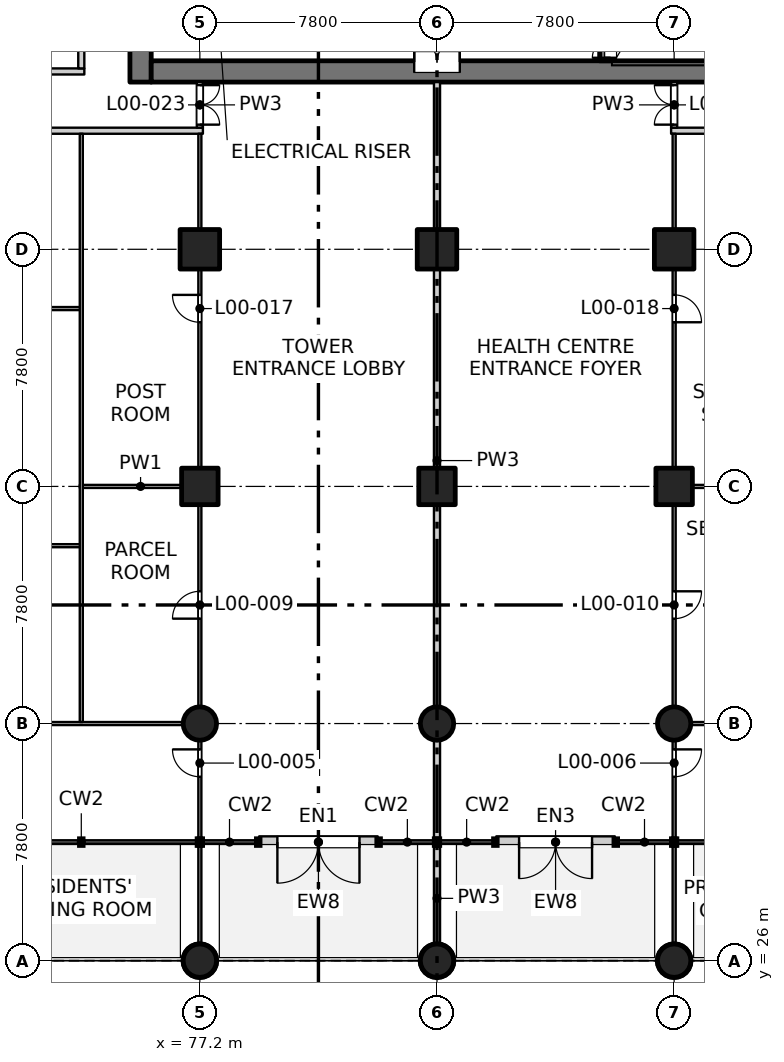
"""IFC4 building model, lengths in metres.
Left out: names, types, materials, properties, quantities, classifications, styles, units other than length and angle.
Written with IfcOpenShell. Run it as: python <this file> out.ifc"""

import sys

from ifc_helpers import new_model, si_unit, direction, frame, frame_2d, origin, origin_2d, place, context, subcontext, project, spatial, rectangle, circle, extrude, element, fill, save


model = new_model("IFC4")
c1 = context("Model", 3, precision=1e-05, world=origin(), true_north=direction((0.0, 1.0)))
c2 = subcontext(c1, "Body", "Model", "MODEL_VIEW")
j1 = project(units=[si_unit("LENGTHUNIT", "METRE"), si_unit("PLANEANGLEUNIT", "RADIAN")], contexts=[c1])
p1 = place(None, origin())
s1 = spatial("IfcSite", under=j1, at=p1, CompositionType="ELEMENT")
p2 = place(p1, origin())
s2 = spatial("IfcBuilding", under=s1, at=p2, CompositionType="ELEMENT")
p3 = place(p2, origin())
s3 = spatial("IfcBuildingStorey", under=s2, at=p3, CompositionType="ELEMENT", Elevation=0.0)
for number, where, z_axis, x_axis in (
    (1, (77.2, 41.6, -0.4), (0.0, 0.0, 1.0), (1.0, 0.0, 0.0)),
    (2, (85.0, 41.6, -0.4), (0.0, 0.0, 1.0), (1.0, 0.0, 0.0)),
    (3, (92.8, 41.6, -0.4), (0.0, 0.0, 1.0), (1.0, 0.0, 0.0)),
):
    element("IfcColumn", number, at=place(p3, frame(where, z_axis=z_axis, x_axis=x_axis)), inside=s3, PredefinedType="COLUMN", context=c2, shape_type="SweptSolid", body=[
        extrude(rectangle(XDim=1.2, YDim=1.2, at=origin_2d()), origin(), (0.0, 0.0, 1.0), 6.1),
    ])
for number, where, z_axis, x_axis in (
    (4, (77.2, 49.4, -0.4), (0.0, 0.0, 1.0), (1.0, 0.0, 0.0)),
    (5, (85.0, 49.4, -0.4), (0.0, 0.0, 1.0), (1.0, 0.0, 0.0)),
    (6, (92.8, 49.4, -0.4), (0.0, 0.0, 1.0), (1.0, 0.0, 0.0)),
):
    element("IfcColumn", number, at=place(p3, frame(where, z_axis=z_axis, x_axis=x_axis)), inside=s3, PredefinedType="COLUMN", context=c2, shape_type="SweptSolid", body=[
        extrude(rectangle(XDim=1.3, YDim=1.3, at=origin_2d()), origin(), (0.0, 0.0, 1.0), 6.1),
    ])
for number, where, z_axis, x_axis in (
    (7, (77.2, 26.0, -0.4), (0.0, 0.0, 1.0), (1.0, 0.0, 0.0)),
    (8, (77.2, 33.8, -0.4), (0.0, 0.0, 1.0), (1.0, 0.0, 0.0)),
    (9, (85.0, 26.0, -0.4), (0.0, 0.0, 1.0), (1.0, 0.0, 0.0)),
    (10, (85.0, 33.8, -0.4), (0.0, 0.0, 1.0), (1.0, 0.0, 0.0)),
    (11, (92.8, 26.0, -0.4), (0.0, 0.0, 1.0), (1.0, 0.0, 0.0)),
    (12, (92.8, 33.8, -0.4), (0.0, 0.0, 1.0), (1.0, 0.0, 0.0)),
):
    element("IfcColumn", number, at=place(p3, frame(where, z_axis=z_axis, x_axis=x_axis)), inside=s3, PredefinedType="COLUMN", context=c2, shape_type="SweptSolid", body=[
        extrude(circle(Radius=0.55, at=origin_2d()), origin(), (0.0, 0.0, 1.0), 6.1),
    ])
p4 = place(p3, frame((75.25, 54.9, -0.4), z_axis=(0.0, 0.0, 1.0), x_axis=(0.0, 1.0, 0.0)))
e13 = element("IfcWall", 13, at=p4, inside=s3, PredefinedType="SOLIDWALL", context=c2, shape_type="SweptSolid", body=[
    extrude(rectangle(XDim=22.4, YDim=0.7, at=frame_2d((11.2, 0.0))), origin(), (0.0, 0.0, 1.0), 6.1),
])
p5 = place(p4, frame((7.55, 0.0, 0.4)))
e14 = element("IfcOpeningElement", 14, at=p5, cuts=e13, PredefinedType="OPENING", context=c2, shape_type="SweptSolid", body=[
    extrude(rectangle(XDim=0.9, YDim=2.1, at=frame_2d((0.45, 1.05))), frame((0.0, 0.36, 0.0), z_axis=(0.0, -1.0, 0.0), x_axis=(1.0, 0.0, 0.0)), (0.0, 0.0, 1.0), 0.72),
])
p6 = place(p4, frame((10.85, 0.0, 0.4)))
e15 = element("IfcOpeningElement", 15, at=p6, cuts=e13, PredefinedType="OPENING", context=c2, shape_type="SweptSolid", body=[
    extrude(rectangle(XDim=0.9, YDim=2.1, at=frame_2d((0.45, 1.05))), frame((0.0, 0.36, 0.0), z_axis=(0.0, -1.0, 0.0), x_axis=(1.0, 0.0, 0.0)), (0.0, 0.0, 1.0), 0.72),
])
p7 = place(p4, frame((13.85, 0.0, 0.4)))
e16 = element("IfcOpeningElement", 16, at=p7, cuts=e13, PredefinedType="OPENING", context=c2, shape_type="SweptSolid", body=[
    extrude(rectangle(XDim=0.9, YDim=2.1, at=frame_2d((0.45, 1.05))), frame((0.0, 0.36, 0.0), z_axis=(0.0, -1.0, 0.0), x_axis=(1.0, 0.0, 0.0)), (0.0, 0.0, 1.0), 0.72),
])
p8 = place(p4, frame((16.85, 0.0, 0.4)))
e17 = element("IfcOpeningElement", 17, at=p8, cuts=e13, PredefinedType="OPENING", context=c2, shape_type="SweptSolid", body=[
    extrude(rectangle(XDim=0.9, YDim=2.1, at=frame_2d((0.45, 1.05))), frame((0.0, 0.36, 0.0), z_axis=(0.0, -1.0, 0.0), x_axis=(1.0, 0.0, 0.0)), (0.0, 0.0, 1.0), 0.72),
])
p9 = place(p4, frame((20.15, 0.0, 0.4)))
e18 = element("IfcOpeningElement", 18, at=p9, cuts=e13, PredefinedType="OPENING", context=c2, shape_type="SweptSolid", body=[
    extrude(rectangle(XDim=0.9, YDim=2.1, at=frame_2d((0.45, 1.05))), frame((0.0, 0.36, 0.0), z_axis=(0.0, -1.0, 0.0), x_axis=(1.0, 0.0, 0.0)), (0.0, 0.0, 1.0), 0.72),
])
p10 = place(p3, frame((75.6, 55.25, -0.4), z_axis=(0.0, 0.0, 1.0), x_axis=(1.0, 0.0, 0.0)))
e19 = element("IfcWall", 19, at=p10, inside=s3, PredefinedType="SOLIDWALL", context=c2, shape_type="SweptSolid", body=[
    extrude(rectangle(XDim=18.8, YDim=0.7, at=frame_2d((9.4, 0.0))), origin(), (0.0, 0.0, 1.0), 6.1),
])
p11 = place(p10, frame((8.65, 0.0, 0.4)))
e20 = element("IfcOpeningElement", 20, at=p11, cuts=e19, PredefinedType="OPENING", context=c2, shape_type="SweptSolid", body=[
    extrude(rectangle(XDim=1.5, YDim=2.1, at=frame_2d((0.75, 1.05))), frame((0.0, 0.36, 0.0), z_axis=(0.0, -1.0, 0.0), x_axis=(1.0, 0.0, 0.0)), (0.0, 0.0, 1.0), 0.72),
])
p12 = place(p3, frame((90.55, 55.6, -0.4), z_axis=(0.0, 0.0, 1.0), x_axis=(0.0, 1.0, 0.0)))
e21 = element("IfcWall", 21, at=p12, inside=s3, PredefinedType="SOLIDWALL", context=c2, shape_type="SweptSolid", body=[
    extrude(rectangle(XDim=6.35, YDim=0.4, at=frame_2d((3.175, 0.0))), origin(), (0.0, 0.0, 1.0), 6.1),
])
p13 = place(p12, frame((0.1, 0.0, 0.4)))
e22 = element("IfcOpeningElement", 22, at=p13, cuts=e21, PredefinedType="OPENING", context=c2, shape_type="SweptSolid", body=[
    extrude(rectangle(XDim=1.2, YDim=2.1, at=frame_2d((0.6, 1.05))), frame((0.0, 0.21, 0.0), z_axis=(0.0, -1.0, 0.0), x_axis=(1.0, 0.0, 0.0)), (0.0, 0.0, 1.0), 0.42),
])
p14 = place(p3, frame((79.15, 29.9, 0.0), z_axis=(0.0, 0.0, 1.0), x_axis=(1.0, 0.0, 0.0)))
e23 = element("IfcWall", 23, at=p14, inside=s3, PredefinedType="SOLIDWALL", context=c2, shape_type="SweptSolid", body=[
    extrude(rectangle(XDim=3.9, YDim=0.38, at=frame_2d((1.95, 0.0))), origin(), (0.0, 0.0, 1.0), 5.7),
])
p15 = place(p14, frame((0.6, 0.0, 0.0)))
e24 = element("IfcOpeningElement", 24, at=p15, cuts=e23, PredefinedType="OPENING", context=c2, shape_type="SweptSolid", body=[
    extrude(rectangle(XDim=2.7, YDim=2.7, at=frame_2d((1.35, 1.35))), frame((0.0, 0.2, 0.0), z_axis=(0.0, -1.0, 0.0), x_axis=(1.0, 0.0, 0.0)), (0.0, 0.0, 1.0), 0.4),
])
p16 = place(p3, frame((86.95, 29.9, 0.0), z_axis=(0.0, 0.0, 1.0), x_axis=(1.0, 0.0, 0.0)))
e25 = element("IfcWall", 25, at=p16, inside=s3, PredefinedType="SOLIDWALL", context=c2, shape_type="SweptSolid", body=[
    extrude(rectangle(XDim=3.9, YDim=0.38, at=frame_2d((1.95, 0.0))), origin(), (0.0, 0.0, 1.0), 5.7),
])
p17 = place(p16, frame((0.75, 0.0, 0.0)))
e26 = element("IfcOpeningElement", 26, at=p17, cuts=e25, PredefinedType="OPENING", context=c2, shape_type="SweptSolid", body=[
    extrude(rectangle(XDim=2.4, YDim=2.4, at=frame_2d((1.2, 1.2))), frame((0.0, 0.2, 0.0), z_axis=(0.0, -1.0, 0.0), x_axis=(1.0, 0.0, 0.0)), (0.0, 0.0, 1.0), 0.4),
])
p18 = place(p3, frame((64.4, 33.8, 0.0), z_axis=(0.0, 0.0, 1.0), x_axis=(1.0, 0.0, 0.0)))
e27 = element("IfcWall", 27, at=p18, inside=s3, PredefinedType="PARTITIONING", context=c2, shape_type="SweptSolid", body=[
    extrude(rectangle(XDim=12.85, YDim=0.1, at=frame_2d((6.425, 0.0))), origin(), (0.0, 0.0, 1.0), 5.7),
])
p19 = place(p3, frame((92.75, 33.8, 0.0), z_axis=(0.0, 0.0, 1.0), x_axis=(1.0, 0.0, 0.0)))
e28 = element("IfcWall", 28, at=p19, inside=s3, PredefinedType="PARTITIONING", context=c2, shape_type="SweptSolid", body=[
    extrude(rectangle(XDim=4.0, YDim=0.1, at=frame_2d((2.0, 0.0))), origin(), (0.0, 0.0, 1.0), 5.7),
])
p20 = place(p3, frame((59.55, 39.65, 0.0), z_axis=(0.0, 0.0, 1.0), x_axis=(1.0, 0.0, 0.0)))
e29 = element("IfcWall", 29, at=p20, inside=s3, PredefinedType="PARTITIONING", context=c2, shape_type="SweptSolid", body=[
    extrude(rectangle(XDim=13.8, YDim=0.1, at=frame_2d((6.9, 0.0))), origin(), (0.0, 0.0, 1.0), 5.7),
])
for number, where, z_axis, x_axis in (
    (30, (73.25, 41.6, 0.0), (0.0, 0.0, 1.0), (1.0, 0.0, 0.0)),
    (31, (92.75, 41.6, 0.0), (0.0, 0.0, 1.0), (1.0, 0.0, 0.0)),
):
    element("IfcWall", number, at=place(p3, frame(where, z_axis=z_axis, x_axis=x_axis)), inside=s3, PredefinedType="PARTITIONING", context=c2, shape_type="SweptSolid", body=[
        extrude(rectangle(XDim=4.0, YDim=0.1, at=frame_2d((2.0, 0.0))), origin(), (0.0, 0.0, 1.0), 5.7),
    ])
p21 = place(p3, frame((59.55, 47.45, 0.0), z_axis=(0.0, 0.0, 1.0), x_axis=(1.0, 0.0, 0.0)))
e32 = element("IfcWall", 32, at=p21, inside=s3, PredefinedType="PARTITIONING", context=c2, shape_type="SweptSolid", body=[
    extrude(rectangle(XDim=13.8, YDim=0.1, at=frame_2d((6.9, 0.0))), origin(), (0.0, 0.0, 1.0), 5.7),
])
for number, where, z_axis, x_axis in (
    (33, (59.55, 53.3, 0.0), (0.0, 0.0, 1.0), (1.0, 0.0, 0.0)),
    (34, (92.7, 53.3, 0.0), (0.0, 0.0, 1.0), (1.0, 0.0, 0.0)),
):
    element("IfcWall", number, at=place(p3, frame(where, z_axis=z_axis, x_axis=x_axis)), inside=s3, PredefinedType="PARTITIONING", context=c2, shape_type="SweptSolid", body=[
        extrude(rectangle(XDim=17.75, YDim=0.2, at=frame_2d((8.875, 0.0))), origin(), (0.0, 0.0, 1.0), 5.7),
    ])
p22 = place(p3, frame((59.55, 55.25, 0.0), z_axis=(0.0, 0.0, 1.0), x_axis=(1.0, 0.0, 0.0)))
e35 = element("IfcWall", 35, at=p22, inside=s3, PredefinedType="PARTITIONING", context=c2, shape_type="SweptSolid", body=[
    extrude(rectangle(XDim=13.85, YDim=0.2, at=frame_2d((6.925, 0.0))), origin(), (0.0, 0.0, 1.0), 5.7),
])
p23 = place(p3, frame((73.3, 33.85, 0.0), z_axis=(0.0, 0.0, 1.0), x_axis=(0.0, 1.0, 0.0)))
e36 = element("IfcWall", 36, at=p23, inside=s3, PredefinedType="PARTITIONING", context=c2, shape_type="SweptSolid", body=[
    extrude(rectangle(XDim=19.35, YDim=0.1, at=frame_2d((9.675, 0.0))), origin(), (0.0, 0.0, 1.0), 5.7),
])
p24 = place(p3, frame((73.3, 55.35, 0.0), z_axis=(0.0, 0.0, 1.0), x_axis=(0.0, 1.0, 0.0)))
e37 = element("IfcWall", 37, at=p24, inside=s3, PredefinedType="PARTITIONING", context=c2, shape_type="SweptSolid", body=[
    extrude(rectangle(XDim=32.75, YDim=0.2, at=frame_2d((16.375, 0.0))), origin(), (0.0, 0.0, 1.0), 5.7),
])
p25 = place(p3, frame((77.2, 26.3, 0.0), z_axis=(0.0, 0.0, 1.0), x_axis=(0.0, 1.0, 0.0)))
e38 = element("IfcWall", 38, at=p25, inside=s3, PredefinedType="PARTITIONING", context=c2, shape_type="SweptSolid", body=[
    extrude(rectangle(XDim=3.5, YDim=0.1, at=frame_2d((1.75, 0.0))), origin(), (0.0, 0.0, 1.0), 5.7),
])
p26 = place(p3, frame((77.2, 30.0, 0.0), z_axis=(0.0, 0.0, 1.0), x_axis=(0.0, 1.0, 0.0)))
e39 = element("IfcWall", 39, at=p26, inside=s3, PredefinedType="PARTITIONING", context=c2, shape_type="SweptSolid", body=[
    extrude(rectangle(XDim=23.2, YDim=0.1, at=frame_2d((11.6, 0.0))), origin(), (0.0, 0.0, 1.0), 5.7),
])
p27 = place(p26, frame((2.05, 0.0, 0.0)))
e40 = element("IfcOpeningElement", 40, at=p27, cuts=e39, PredefinedType="OPENING", context=c2, shape_type="SweptSolid", body=[
    extrude(rectangle(XDim=0.9, YDim=2.1, at=frame_2d((0.45, 1.05))), frame((0.0, 0.06, 0.0), z_axis=(0.0, -1.0, 0.0), x_axis=(1.0, 0.0, 0.0)), (0.0, 0.0, 1.0), 0.12),
])
p28 = place(p26, frame((7.25, 0.0, 0.0)))
e41 = element("IfcOpeningElement", 41, at=p28, cuts=e39, PredefinedType="OPENING", context=c2, shape_type="SweptSolid", body=[
    extrude(rectangle(XDim=0.9, YDim=2.1, at=frame_2d((0.45, 1.05))), frame((0.0, 0.06, 0.0), z_axis=(0.0, -1.0, 0.0), x_axis=(1.0, 0.0, 0.0)), (0.0, 0.0, 1.0), 0.12),
])
p29 = place(p26, frame((17.0, 0.0, 0.0)))
e42 = element("IfcOpeningElement", 42, at=p29, cuts=e39, PredefinedType="OPENING", context=c2, shape_type="SweptSolid", body=[
    extrude(rectangle(XDim=0.9, YDim=2.1, at=frame_2d((0.45, 1.05))), frame((0.0, 0.06, 0.0), z_axis=(0.0, -1.0, 0.0), x_axis=(1.0, 0.0, 0.0)), (0.0, 0.0, 1.0), 0.12),
])
p30 = place(p3, frame((77.2, 53.4, 0.0), z_axis=(0.0, 0.0, 1.0), x_axis=(0.0, 1.0, 0.0)))
e43 = element("IfcWall", 43, at=p30, inside=s3, PredefinedType="PARTITIONING", context=c2, shape_type="SweptSolid", body=[
    extrude(rectangle(XDim=1.5, YDim=0.2, at=frame_2d((0.75, 0.0))), origin(), (0.0, 0.0, 1.0), 5.7),
])
p31 = place(p30, frame((0.1, 0.0, 0.0)))
e44 = element("IfcOpeningElement", 44, at=p31, cuts=e43, PredefinedType="OPENING", context=c2, shape_type="SweptSolid", body=[
    extrude(rectangle(XDim=1.3, YDim=2.1, at=frame_2d((0.65, 1.05))), frame((0.0, 0.11, 0.0), z_axis=(0.0, -1.0, 0.0), x_axis=(1.0, 0.0, 0.0)), (0.0, 0.0, 1.0), 0.22),
])
p32 = place(p3, frame((85.0, 26.3, 0.0), z_axis=(0.0, 0.0, 1.0), x_axis=(0.0, 1.0, 0.0)))
e45 = element("IfcWall", 45, at=p32, inside=s3, PredefinedType="PARTITIONING", context=c2, shape_type="SweptSolid", body=[
    extrude(rectangle(XDim=3.5, YDim=0.2, at=frame_2d((1.75, 0.0))), origin(), (0.0, 0.0, 1.0), 5.7),
])
p33 = place(p3, frame((85.0, 30.0, 0.0), z_axis=(0.0, 0.0, 1.0), x_axis=(0.0, 1.0, 0.0)))
e46 = element("IfcWall", 46, at=p33, inside=s3, PredefinedType="PARTITIONING", context=c2, shape_type="SweptSolid", body=[
    extrude(rectangle(XDim=24.9, YDim=0.2, at=frame_2d((12.45, 0.0))), origin(), (0.0, 0.0, 1.0), 5.7),
])
p34 = place(p3, frame((92.8, 26.3, 0.0), z_axis=(0.0, 0.0, 1.0), x_axis=(0.0, 1.0, 0.0)))
e47 = element("IfcWall", 47, at=p34, inside=s3, PredefinedType="PARTITIONING", context=c2, shape_type="SweptSolid", body=[
    extrude(rectangle(XDim=3.5, YDim=0.1, at=frame_2d((1.75, 0.0))), origin(), (0.0, 0.0, 1.0), 5.7),
])
p35 = place(p3, frame((92.8, 30.0, 0.0), z_axis=(0.0, 0.0, 1.0), x_axis=(0.0, 1.0, 0.0)))
e48 = element("IfcWall", 48, at=p35, inside=s3, PredefinedType="PARTITIONING", context=c2, shape_type="SweptSolid", body=[
    extrude(rectangle(XDim=23.2, YDim=0.1, at=frame_2d((11.6, 0.0))), origin(), (0.0, 0.0, 1.0), 5.7),
])
p36 = place(p35, frame((2.05, 0.0, 0.0)))
e49 = element("IfcOpeningElement", 49, at=p36, cuts=e48, PredefinedType="OPENING", context=c2, shape_type="SweptSolid", body=[
    extrude(rectangle(XDim=0.9, YDim=2.1, at=frame_2d((0.45, 1.05))), frame((0.0, 0.06, 0.0), z_axis=(0.0, -1.0, 0.0), x_axis=(1.0, 0.0, 0.0)), (0.0, 0.0, 1.0), 0.12),
])
p37 = place(p35, frame((7.25, 0.0, 0.0)))
e50 = element("IfcOpeningElement", 50, at=p37, cuts=e48, PredefinedType="OPENING", context=c2, shape_type="SweptSolid", body=[
    extrude(rectangle(XDim=0.9, YDim=2.1, at=frame_2d((0.45, 1.05))), frame((0.0, 0.06, 0.0), z_axis=(0.0, -1.0, 0.0), x_axis=(1.0, 0.0, 0.0)), (0.0, 0.0, 1.0), 0.12),
])
p38 = place(p35, frame((17.0, 0.0, 0.0)))
e51 = element("IfcOpeningElement", 51, at=p38, cuts=e48, PredefinedType="OPENING", context=c2, shape_type="SweptSolid", body=[
    extrude(rectangle(XDim=0.9, YDim=2.1, at=frame_2d((0.45, 1.05))), frame((0.0, 0.06, 0.0), z_axis=(0.0, -1.0, 0.0), x_axis=(1.0, 0.0, 0.0)), (0.0, 0.0, 1.0), 0.12),
])
p39 = place(p3, frame((92.8, 53.4, 0.0), z_axis=(0.0, 0.0, 1.0), x_axis=(0.0, 1.0, 0.0)))
e52 = element("IfcWall", 52, at=p39, inside=s3, PredefinedType="PARTITIONING", context=c2, shape_type="SweptSolid", body=[
    extrude(rectangle(XDim=1.5, YDim=0.2, at=frame_2d((0.75, 0.0))), origin(), (0.0, 0.0, 1.0), 5.7),
])
p40 = place(p39, frame((0.1, 0.0, 0.0)))
e53 = element("IfcOpeningElement", 53, at=p40, cuts=e52, PredefinedType="OPENING", context=c2, shape_type="SweptSolid", body=[
    extrude(rectangle(XDim=1.3, YDim=2.1, at=frame_2d((0.65, 1.05))), frame((0.0, 0.11, 0.0), z_axis=(0.0, -1.0, 0.0), x_axis=(1.0, 0.0, 0.0)), (0.0, 0.0, 1.0), 0.22),
])
p41 = place(p15, frame((2.7, 0.0, 0.0), z_axis=(0.0, 0.0, 1.0), x_axis=(-1.0, 0.0, 0.0)))
e54 = element("IfcDoor", 54, at=p41, inside=s3, OperationType="DOUBLE_DOOR_SINGLE_SWING", PredefinedType="DOOR", context=c2, shape_type="SweptSolid", body=[
    extrude(rectangle(XDim=2.7, YDim=2.7, at=frame_2d((1.35, 1.35))), frame((0.0, 0.025, 0.0), z_axis=(0.0, -1.0, 0.0), x_axis=(1.0, 0.0, 0.0)), (0.0, 0.0, 1.0), 0.05),
])
fill(e24, e54)
p42 = place(p17, frame((2.4, 0.0, 0.0), z_axis=(0.0, 0.0, 1.0), x_axis=(-1.0, 0.0, 0.0)))
e55 = element("IfcDoor", 55, at=p42, inside=s3, OperationType="DOUBLE_DOOR_SINGLE_SWING", PredefinedType="DOOR", context=c2, shape_type="SweptSolid", body=[
    extrude(rectangle(XDim=2.4, YDim=2.4, at=frame_2d((1.2, 1.2))), frame((0.0, 0.025, 0.0), z_axis=(0.0, -1.0, 0.0), x_axis=(1.0, 0.0, 0.0)), (0.0, 0.0, 1.0), 0.05),
])
fill(e26, e55)
p43 = place(p27, origin())
e56 = element("IfcDoor", 56, at=p43, inside=s3, OperationType="SINGLE_SWING_RIGHT", PredefinedType="DOOR", context=c2, shape_type="SweptSolid", body=[
    extrude(rectangle(XDim=0.9, YDim=2.1, at=frame_2d((0.45, 1.05))), frame((0.0, 0.025, 0.0), z_axis=(0.0, -1.0, 0.0), x_axis=(1.0, 0.0, 0.0)), (0.0, 0.0, 1.0), 0.05),
])
fill(e40, e56)
p44 = place(p36, origin())
e57 = element("IfcDoor", 57, at=p44, inside=s3, OperationType="SINGLE_SWING_LEFT", PredefinedType="DOOR", context=c2, shape_type="SweptSolid", body=[
    extrude(rectangle(XDim=0.9, YDim=2.1, at=frame_2d((0.45, 1.05))), frame((0.0, 0.025, 0.0), z_axis=(0.0, -1.0, 0.0), x_axis=(1.0, 0.0, 0.0)), (0.0, 0.0, 1.0), 0.05),
])
fill(e49, e57)
p45 = place(p28, origin())
e58 = element("IfcDoor", 58, at=p45, inside=s3, OperationType="SINGLE_SWING_LEFT", PredefinedType="DOOR", context=c2, shape_type="SweptSolid", body=[
    extrude(rectangle(XDim=0.9, YDim=2.1, at=frame_2d((0.45, 1.05))), frame((0.0, 0.025, 0.0), z_axis=(0.0, -1.0, 0.0), x_axis=(1.0, 0.0, 0.0)), (0.0, 0.0, 1.0), 0.05),
])
fill(e41, e58)
p46 = place(p37, origin())
e59 = element("IfcDoor", 59, at=p46, inside=s3, OperationType="SINGLE_SWING_LEFT", PredefinedType="DOOR", context=c2, shape_type="SweptSolid", body=[
    extrude(rectangle(XDim=0.9, YDim=2.1, at=frame_2d((0.45, 1.05))), frame((0.0, 0.025, 0.0), z_axis=(0.0, -1.0, 0.0), x_axis=(1.0, 0.0, 0.0)), (0.0, 0.0, 1.0), 0.05),
])
fill(e50, e59)
p47 = place(p29, origin())
e60 = element("IfcDoor", 60, at=p47, inside=s3, OperationType="SINGLE_SWING_RIGHT", PredefinedType="DOOR", context=c2, shape_type="SweptSolid", body=[
    extrude(rectangle(XDim=0.9, YDim=2.1, at=frame_2d((0.45, 1.05))), frame((0.0, 0.025, 0.0), z_axis=(0.0, -1.0, 0.0), x_axis=(1.0, 0.0, 0.0)), (0.0, 0.0, 1.0), 0.05),
])
fill(e42, e60)
p48 = place(p38, origin())
e61 = element("IfcDoor", 61, at=p48, inside=s3, OperationType="SINGLE_SWING_RIGHT", PredefinedType="DOOR", context=c2, shape_type="SweptSolid", body=[
    extrude(rectangle(XDim=0.9, YDim=2.1, at=frame_2d((0.45, 1.05))), frame((0.0, 0.025, 0.0), z_axis=(0.0, -1.0, 0.0), x_axis=(1.0, 0.0, 0.0)), (0.0, 0.0, 1.0), 0.05),
])
fill(e51, e61)
p49 = place(p31, origin())
e62 = element("IfcDoor", 62, at=p49, inside=s3, OperationType="DOUBLE_DOOR_SINGLE_SWING", PredefinedType="DOOR", context=c2, shape_type="SweptSolid", body=[
    extrude(rectangle(XDim=1.3, YDim=2.1, at=frame_2d((0.65, 1.05))), frame((0.0, 0.025, 0.0), z_axis=(0.0, -1.0, 0.0), x_axis=(1.0, 0.0, 0.0)), (0.0, 0.0, 1.0), 0.05),
])
fill(e44, e62)
p50 = place(p40, origin())
e63 = element("IfcDoor", 63, at=p50, inside=s3, OperationType="DOUBLE_DOOR_SINGLE_SWING", PredefinedType="DOOR", context=c2, shape_type="SweptSolid", body=[
    extrude(rectangle(XDim=1.3, YDim=2.1, at=frame_2d((0.65, 1.05))), frame((0.0, 0.025, 0.0), z_axis=(0.0, -1.0, 0.0), x_axis=(1.0, 0.0, 0.0)), (0.0, 0.0, 1.0), 0.05),
])
fill(e53, e63)
p51 = place(p11, origin())
e64 = element("IfcDoor", 64, at=p51, inside=s3, OperationType="DOUBLE_DOOR_SINGLE_SWING", PredefinedType="DOOR", context=c2, shape_type="SweptSolid", body=[
    extrude(rectangle(XDim=1.5, YDim=2.1, at=frame_2d((0.75, 1.05))), frame((0.0, 0.335, 0.0), z_axis=(0.0, -1.0, 0.0), x_axis=(1.0, 0.0, 0.0)), (0.0, 0.0, 1.0), 0.05),
])
fill(e20, e64)
p52 = place(p13, origin())
e65 = element("IfcDoor", 65, at=p52, inside=s3, OperationType="DOUBLE_DOOR_SINGLE_SWING", PredefinedType="DOOR", context=c2, shape_type="SweptSolid", body=[
    extrude(rectangle(XDim=1.2, YDim=2.1, at=frame_2d((0.6, 1.05))), frame((0.0, -0.135, 0.0), z_axis=(0.0, -1.0, 0.0), x_axis=(1.0, 0.0, 0.0)), (0.0, 0.0, 1.0), 0.05),
])
fill(e22, e65)
save(model, sys.argv[1])
